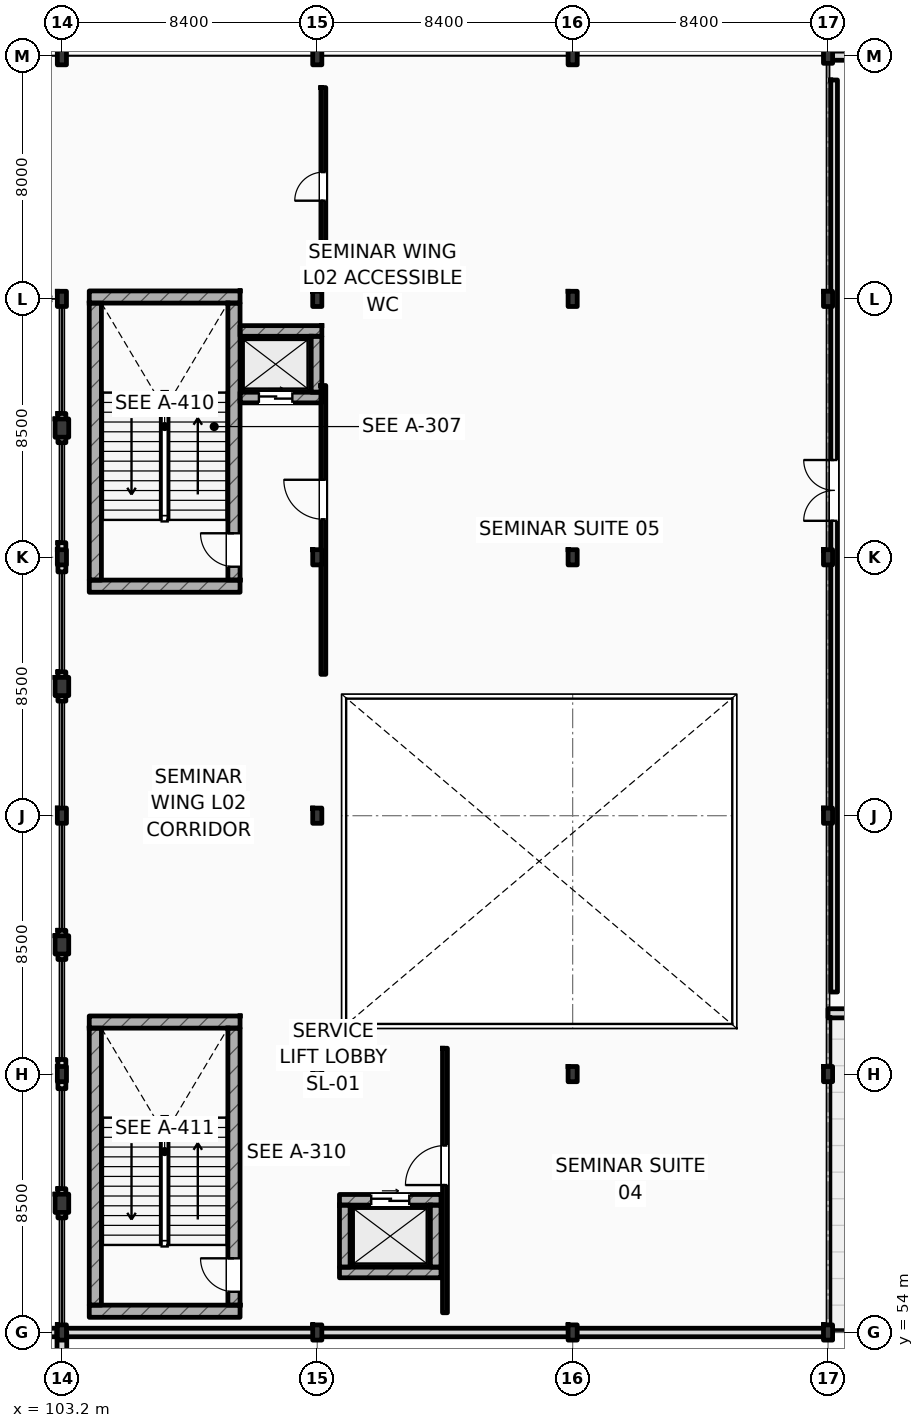
"""IFC4 building model, lengths in metres.
Left out: names, types, materials, properties, quantities, classifications, styles, units other than length and angle.
Written with IfcOpenShell. Run it as: python <this file> out.ifc"""

import sys

from ifc_helpers import new_model, si_unit, direction, frame, frame_2d, origin, origin_2d, place, context, subcontext, project, spatial, rectangle, i_section, extrude, element, fill, save


model = new_model("IFC4")
c1 = context("Model", 3, precision=1e-05, world=origin(), true_north=direction((0.0, 1.0)))
c2 = subcontext(c1, "Body", "Model", "MODEL_VIEW")
j1 = project(units=[si_unit("LENGTHUNIT", "METRE"), si_unit("PLANEANGLEUNIT", "RADIAN")], contexts=[c1])
p1 = place(None, origin())
s1 = spatial("IfcSite", under=j1, at=p1, CompositionType="ELEMENT")
p2 = place(p1, origin())
s2 = spatial("IfcBuilding", under=s1, at=p2, CompositionType="ELEMENT")
p3 = place(p2, frame((0.0, 0.0, 11.4)))
s3 = spatial("IfcBuildingStorey", under=s2, at=p3, CompositionType="ELEMENT", Elevation=11.4)
for number, where, z_axis, x_axis in (
    (1, (103.2, 96.0, 0.0), (0.0, 0.0, 1.0), (1.0, 0.0, 0.0)),
    (2, (111.6, 96.0, 0.0), (0.0, 0.0, 1.0), (1.0, 0.0, 0.0)),
    (3, (120.0, 96.0, 0.0), (0.0, 0.0, 1.0), (1.0, 0.0, 0.0)),
):
    element("IfcColumn", number, at=place(p3, frame(where, z_axis=z_axis, x_axis=x_axis)), inside=s3, PredefinedType="COLUMN", context=c2, shape_type="SweptSolid", body=[
        extrude(i_section(OverallWidth=0.3, OverallDepth=0.6, WebThickness=0.015, FlangeThickness=0.03, FilletRadius=0.027, at=origin_2d()), origin(), (0.0, 0.0, 1.0), 4.8),
    ])
for number, where, z_axis, x_axis in (
    (4, (103.2, 88.0, 0.0), (0.0, 0.0, 1.0), (1.0, 0.0, 0.0)),
    (5, (103.2, 54.0, 0.0), (0.0, 0.0, 1.0), (1.0, 0.0, 0.0)),
    (6, (103.2, 62.5, 0.0), (0.0, 0.0, 1.0), (1.0, 0.0, 0.0)),
    (7, (103.2, 71.0, 0.0), (0.0, 0.0, 1.0), (1.0, 0.0, 0.0)),
    (8, (103.2, 79.5, 0.0), (0.0, 0.0, 1.0), (1.0, 0.0, 0.0)),
    (9, (111.6, 54.0, 0.0), (0.0, 0.0, 1.0), (1.0, 0.0, 0.0)),
    (10, (111.6, 62.5, 0.0), (0.0, 0.0, 1.0), (1.0, 0.0, 0.0)),
    (11, (111.6, 71.0, 0.0), (0.0, 0.0, 1.0), (1.0, 0.0, 0.0)),
    (12, (111.6, 79.5, 0.0), (0.0, 0.0, 1.0), (1.0, 0.0, 0.0)),
    (13, (111.6, 88.0, 0.0), (0.0, 0.0, 1.0), (1.0, 0.0, 0.0)),
    (14, (120.0, 54.0, 0.0), (0.0, 0.0, 1.0), (1.0, 0.0, 0.0)),
    (15, (120.0, 62.5, 0.0), (0.0, 0.0, 1.0), (1.0, 0.0, 0.0)),
    (16, (120.0, 79.5, 0.0), (0.0, 0.0, 1.0), (1.0, 0.0, 0.0)),
    (17, (120.0, 88.0, 0.0), (0.0, 0.0, 1.0), (1.0, 0.0, 0.0)),
    (18, (128.4, 54.0, 0.0), (0.0, 0.0, 1.0), (1.0, 0.0, 0.0)),
    (19, (128.4, 62.5, 0.0), (0.0, 0.0, 1.0), (1.0, 0.0, 0.0)),
    (20, (128.4, 71.0, 0.0), (0.0, 0.0, 1.0), (1.0, 0.0, 0.0)),
    (21, (128.4, 79.5, 0.0), (0.0, 0.0, 1.0), (1.0, 0.0, 0.0)),
    (22, (128.4, 88.0, 0.0), (0.0, 0.0, 1.0), (1.0, 0.0, 0.0)),
    (23, (128.4, 96.0, 0.0), (0.0, 0.0, 1.0), (1.0, 0.0, 0.0)),
):
    element("IfcColumn", number, at=place(p3, frame(where, z_axis=z_axis, x_axis=x_axis)), inside=s3, PredefinedType="COLUMN", context=c2, shape_type="SweptSolid", body=[
        extrude(i_section(OverallWidth=0.3, OverallDepth=0.5, WebThickness=0.014, FlangeThickness=0.028, FilletRadius=0.027, at=origin_2d()), origin(), (0.0, 0.0, 1.0), 4.8),
    ])
for number, where, z_axis, x_axis in (
    (24, (103.2, 58.25, 0.0), (0.0, 0.0, 1.0), (1.0, 0.0, 0.0)),
    (25, (103.2, 66.75, 0.0), (0.0, 0.0, 1.0), (1.0, 0.0, 0.0)),
    (26, (103.2, 75.25, 0.0), (0.0, 0.0, 1.0), (1.0, 0.0, 0.0)),
    (27, (103.2, 83.75, 0.0), (0.0, 0.0, 1.0), (1.0, 0.0, 0.0)),
):
    element("IfcColumn", number, at=place(p3, frame(where, z_axis=z_axis, x_axis=x_axis)), inside=s3, PredefinedType="PILASTER", context=c2, shape_type="SweptSolid", body=[
        extrude(rectangle(XDim=0.45, YDim=0.6, at=origin_2d()), origin(), (0.0, 0.0, 1.0), 4.8),
    ])
for number, where, z_axis, x_axis in (
    (28, (104.1, 88.062, 0.0), (0.0, 0.0, 1.0), (1.0, 0.0, 0.0)),
    (29, (104.1, 78.55, 0.0), (0.0, 0.0, 1.0), (1.0, 0.0, 0.0)),
):
    element("IfcWall", number, at=place(p3, frame(where, z_axis=z_axis, x_axis=x_axis)), inside=s3, PredefinedType="SHEAR", context=c2, shape_type="SweptSolid", body=[
        extrude(rectangle(XDim=4.96, YDim=0.4, at=frame_2d((2.48, 0.0))), origin(), (0.0, 0.0, 1.0), 4.8),
    ])
p4 = place(p3, frame((104.3, 78.75, 0.0), z_axis=(0.0, 0.0, 1.0), x_axis=(0.0, 1.0, 0.0)))
e30 = element("IfcWall", 30, at=p4, inside=s3, PredefinedType="SHEAR", context=c2, shape_type="SweptSolid", body=[
    extrude(rectangle(XDim=9.112, YDim=0.4, at=frame_2d((4.556, 0.0))), origin(), (0.0, 0.0, 1.0), 4.8),
])
p5 = place(p3, frame((108.86, 78.75, 0.0), z_axis=(0.0, 0.0, 1.0), x_axis=(0.0, 1.0, 0.0)))
e31 = element("IfcWall", 31, at=p5, inside=s3, PredefinedType="SHEAR", context=c2, shape_type="SweptSolid", body=[
    extrude(rectangle(XDim=9.112, YDim=0.4, at=frame_2d((4.556, 0.0))), origin(), (0.0, 0.0, 1.0), 4.8),
])
p6 = place(p5, frame((0.44, 0.0, 0.0)))
e32 = element("IfcOpeningElement", 32, at=p6, cuts=e31, PredefinedType="OPENING", context=c2, shape_type="SweptSolid", body=[
    extrude(rectangle(XDim=1.1, YDim=2.2, at=frame_2d((0.55, 1.1))), frame((0.0, 0.21, 0.0), z_axis=(0.0, -1.0, 0.0), x_axis=(1.0, 0.0, 0.0)), (0.0, 0.0, 1.0), 0.42),
])
for number, where, z_axis, x_axis in (
    (33, (104.1, 64.212, 0.0), (0.0, 0.0, 1.0), (1.0, 0.0, 0.0)),
    (34, (104.1, 54.7, 0.0), (0.0, 0.0, 1.0), (1.0, 0.0, 0.0)),
):
    element("IfcWall", number, at=place(p3, frame(where, z_axis=z_axis, x_axis=x_axis)), inside=s3, PredefinedType="SHEAR", context=c2, shape_type="SweptSolid", body=[
        extrude(rectangle(XDim=4.96, YDim=0.4, at=frame_2d((2.48, 0.0))), origin(), (0.0, 0.0, 1.0), 4.8),
    ])
p7 = place(p3, frame((104.3, 54.9, 0.0), z_axis=(0.0, 0.0, 1.0), x_axis=(0.0, 1.0, 0.0)))
e35 = element("IfcWall", 35, at=p7, inside=s3, PredefinedType="SHEAR", context=c2, shape_type="SweptSolid", body=[
    extrude(rectangle(XDim=9.112, YDim=0.4, at=frame_2d((4.556, 0.0))), origin(), (0.0, 0.0, 1.0), 4.8),
])
p8 = place(p3, frame((108.86, 54.9, 0.0), z_axis=(0.0, 0.0, 1.0), x_axis=(0.0, 1.0, 0.0)))
e36 = element("IfcWall", 36, at=p8, inside=s3, PredefinedType="SHEAR", context=c2, shape_type="SweptSolid", body=[
    extrude(rectangle(XDim=9.112, YDim=0.4, at=frame_2d((4.556, 0.0))), origin(), (0.0, 0.0, 1.0), 4.8),
])
p9 = place(p8, frame((0.44, 0.0, 0.0)))
e37 = element("IfcOpeningElement", 37, at=p9, cuts=e36, PredefinedType="OPENING", context=c2, shape_type="SweptSolid", body=[
    extrude(rectangle(XDim=1.1, YDim=2.2, at=frame_2d((0.55, 1.1))), frame((0.0, 0.21, 0.0), z_axis=(0.0, -1.0, 0.0), x_axis=(1.0, 0.0, 0.0)), (0.0, 0.0, 1.0), 0.42),
])
p10 = place(p3, frame((103.2, 7.4, 0.0), z_axis=(0.0, 0.0, 1.0), x_axis=(0.0, 1.0, 0.0)))
e38 = element("IfcWall", 38, at=p10, inside=s3, PredefinedType="STANDARD", context=c2, shape_type="SweptSolid", body=[
    extrude(rectangle(XDim=46.6, YDim=0.32, at=frame_2d((23.3, 0.0))), origin(), (0.0, 0.0, 1.0), 4.02),
])
p11 = place(p3, frame((79.8, 54.0, 0.0), z_axis=(0.0, 0.0, 1.0), x_axis=(1.0, 0.0, 0.0)))
e39 = element("IfcWall", 39, at=p11, inside=s3, PredefinedType="STANDARD", context=c2, shape_type="SweptSolid", body=[
    extrude(rectangle(XDim=23.4, YDim=0.28, at=frame_2d((11.7, 0.0))), origin(), (0.0, 0.0, 1.0), 4.06),
])
p12 = place(p11, frame((10.65, 0.0, 1.05)))
e40 = element("IfcOpeningElement", 40, at=p12, cuts=e39, PredefinedType="OPENING", context=c2, shape_type="SweptSolid", body=[
    extrude(rectangle(XDim=2.1, YDim=2.2, at=frame_2d((1.05, 1.1))), frame((0.0, 0.15, 0.0), z_axis=(0.0, -1.0, 0.0), x_axis=(1.0, 0.0, 0.0)), (0.0, 0.0, 1.0), 0.3),
])
p13 = place(p3, frame((103.2, 54.0, 0.0), z_axis=(0.0, 0.0, 1.0), x_axis=(1.0, 0.0, 0.0)))
e41 = element("IfcWall", 41, at=p13, inside=s3, PredefinedType="STANDARD", context=c2, shape_type="SweptSolid", body=[
    extrude(rectangle(XDim=25.2, YDim=0.28, at=frame_2d((12.6, 0.0))), origin(), (0.0, 0.0, 1.0), 3.96),
])
for number, where, z_axis, x_axis in (
    (42, (103.2, 57.77, 0.0), (0.0, 0.0, 1.0), (0.0, 1.0, 0.0)),
    (43, (103.2, 62.02, 0.0), (0.0, 0.0, 1.0), (0.0, 1.0, 0.0)),
    (44, (103.2, 66.27, 0.0), (0.0, 0.0, 1.0), (0.0, 1.0, 0.0)),
    (45, (103.2, 74.77, 0.0), (0.0, 0.0, 1.0), (0.0, 1.0, 0.0)),
    (46, (103.2, 79.02, 0.0), (0.0, 0.0, 1.0), (0.0, 1.0, 0.0)),
    (47, (103.2, 83.27, 0.0), (0.0, 0.0, 1.0), (0.0, 1.0, 0.0)),
):
    element("IfcWall", number, at=place(p3, frame(where, z_axis=z_axis, x_axis=x_axis)), inside=s3, PredefinedType="STANDARD", context=c2, shape_type="SweptSolid", body=[
        extrude(rectangle(XDim=0.96, YDim=0.26, at=frame_2d((0.48, 0.0))), origin(), (0.0, 0.0, 1.0), 4.11),
    ])
p14 = place(p3, frame((128.4, 64.5, 0.0), z_axis=(0.0, 0.0, 1.0), x_axis=(1.0, 0.0, 0.0)))
e48 = element("IfcWall", 48, at=p14, inside=s3, PredefinedType="STANDARD", context=c2, shape_type="SweptSolid", body=[
    extrude(rectangle(XDim=9.0, YDim=0.3, at=frame_2d((4.5, 0.0))), origin(), (0.0, 0.0, 1.0), 4.54),
])
p15 = place(p3, frame((128.4, 96.0, 0.0), z_axis=(0.0, 0.0, 1.0), x_axis=(1.0, 0.0, 0.0)))
e49 = element("IfcWall", 49, at=p15, inside=s3, PredefinedType="STANDARD", context=c2, shape_type="SweptSolid", body=[
    extrude(rectangle(XDim=9.0, YDim=0.3, at=frame_2d((4.5, 0.0))), origin(), (0.0, 0.0, 1.0), 4.05),
])
p16 = place(p3, frame((120.0, 96.0, 0.0), z_axis=(0.0, 0.0, 1.0), x_axis=(0.0, 1.0, 0.0)))
e50 = element("IfcWall", 50, at=p16, inside=s3, PredefinedType="STANDARD", context=c2, shape_type="SweptSolid", body=[
    extrude(rectangle(XDim=22.0, YDim=0.28, at=frame_2d((11.0, 0.0))), origin(), (0.0, 0.0, 1.0), 4.11),
])
p17 = place(p3, frame((109.06, 86.945, 0.0), z_axis=(0.0, 0.0, 1.0), x_axis=(1.0, 0.0, 0.0)))
e51 = element("IfcWall", 51, at=p17, inside=s3, PredefinedType="SHEAR", context=c2, shape_type="SweptSolid", body=[
    extrude(rectangle(XDim=2.69, YDim=0.35, at=frame_2d((1.345, 0.0))), origin(), (0.0, 0.0, 1.0), 4.52),
])
p18 = place(p3, frame((109.06, 84.755, 0.0), z_axis=(0.0, 0.0, 1.0), x_axis=(1.0, 0.0, 0.0)))
e52 = element("IfcWall", 52, at=p18, inside=s3, PredefinedType="SHEAR", context=c2, shape_type="SweptSolid", body=[
    extrude(rectangle(XDim=2.69, YDim=0.35, at=frame_2d((1.345, 0.0))), origin(), (0.0, 0.0, 1.0), 4.52),
])
p19 = place(p18, frame((0.62, 0.0, 0.0)))
e53 = element("IfcOpeningElement", 53, at=p19, cuts=e52, PredefinedType="OPENING", context=c2, shape_type="SweptSolid", body=[
    extrude(rectangle(XDim=1.1, YDim=2.2, at=frame_2d((0.55, 1.1))), frame((0.0, 0.185, 0.0), z_axis=(0.0, -1.0, 0.0), x_axis=(1.0, 0.0, 0.0)), (0.0, 0.0, 1.0), 0.37),
])
p20 = place(p3, frame((111.575, 84.93, 0.0), z_axis=(0.0, 0.0, 1.0), x_axis=(0.0, 1.0, 0.0)))
e54 = element("IfcWall", 54, at=p20, inside=s3, PredefinedType="SHEAR", context=c2, shape_type="SweptSolid", body=[
    extrude(rectangle(XDim=1.84, YDim=0.35, at=frame_2d((0.92, 0.0))), origin(), (0.0, 0.0, 1.0), 4.11),
])
p21 = place(p3, frame((112.33, 58.365, 0.0), z_axis=(0.0, 0.0, 1.0), x_axis=(1.0, 0.0, 0.0)))
e55 = element("IfcWall", 55, at=p21, inside=s3, PredefinedType="SHEAR", context=c2, shape_type="SweptSolid", body=[
    extrude(rectangle(XDim=3.34, YDim=0.35, at=frame_2d((1.67, 0.0))), origin(), (0.0, 0.0, 1.0), 4.52),
])
p22 = place(p21, frame((1.045, 0.0, 0.0)))
e56 = element("IfcOpeningElement", 56, at=p22, cuts=e55, PredefinedType="OPENING", context=c2, shape_type="SweptSolid", body=[
    extrude(rectangle(XDim=1.25, YDim=2.25, at=frame_2d((0.625, 1.125))), frame((0.0, 0.185, 0.0), z_axis=(0.0, -1.0, 0.0), x_axis=(1.0, 0.0, 0.0)), (0.0, 0.0, 1.0), 0.37),
])
p23 = place(p3, frame((112.33, 55.975, 0.0), z_axis=(0.0, 0.0, 1.0), x_axis=(1.0, 0.0, 0.0)))
e57 = element("IfcWall", 57, at=p23, inside=s3, PredefinedType="SHEAR", context=c2, shape_type="SweptSolid", body=[
    extrude(rectangle(XDim=3.34, YDim=0.35, at=frame_2d((1.67, 0.0))), origin(), (0.0, 0.0, 1.0), 4.52),
])
for number, where, z_axis, x_axis in (
    (58, (112.505, 56.15, 0.0), (0.0, 0.0, 1.0), (0.0, 1.0, 0.0)),
    (59, (115.495, 56.15, 0.0), (0.0, 0.0, 1.0), (0.0, 1.0, 0.0)),
):
    element("IfcWall", number, at=place(p3, frame(where, z_axis=z_axis, x_axis=x_axis)), inside=s3, PredefinedType="SHEAR", context=c2, shape_type="SweptSolid", body=[
        extrude(rectangle(XDim=2.04, YDim=0.35, at=frame_2d((1.02, 0.0))), origin(), (0.0, 0.0, 1.0), 4.52),
    ])
p24 = place(p3, frame((115.8, 54.65, 0.0), z_axis=(0.0, 0.0, 1.0), x_axis=(0.0, 1.0, 0.0)))
e60 = element("IfcWall", 60, at=p24, inside=s3, PredefinedType="PARTITIONING", context=c2, shape_type="SweptSolid", body=[
    extrude(rectangle(XDim=8.7, YDim=0.16, at=frame_2d((4.35, 0.0))), origin(), (0.0, 0.0, 1.0), 4.52),
])
p25 = place(p24, frame((4.2, 0.0, 0.0)))
e61 = element("IfcOpeningElement", 61, at=p25, cuts=e60, PredefinedType="OPENING", context=c2, shape_type="SweptSolid", body=[
    extrude(rectangle(XDim=1.3, YDim=2.2, at=frame_2d((0.65, 1.1))), frame((0.0, 0.09, 0.0), z_axis=(0.0, -1.0, 0.0), x_axis=(1.0, 0.0, 0.0)), (0.0, 0.0, 1.0), 0.18),
])
p26 = place(p3, frame((111.8, 75.65, 0.0), z_axis=(0.0, 0.0, 1.0), x_axis=(0.0, 1.0, 0.0)))
e62 = element("IfcWall", 62, at=p26, inside=s3, PredefinedType="PARTITIONING", context=c2, shape_type="SweptSolid", body=[
    extrude(rectangle(XDim=9.5, YDim=0.16, at=frame_2d((4.75, 0.0))), origin(), (0.0, 0.0, 1.0), 4.11),
])
p27 = place(p26, frame((5.1, 0.0, 0.0)))
e63 = element("IfcOpeningElement", 63, at=p27, cuts=e62, PredefinedType="OPENING", context=c2, shape_type="SweptSolid", body=[
    extrude(rectangle(XDim=1.3, YDim=2.2, at=frame_2d((0.65, 1.1))), frame((0.0, 0.09, 0.0), z_axis=(0.0, -1.0, 0.0), x_axis=(1.0, 0.0, 0.0)), (0.0, 0.0, 1.0), 0.18),
])
p28 = place(p3, frame((111.8, 88.45, 0.0), z_axis=(0.0, 0.0, 1.0), x_axis=(0.0, 1.0, 0.0)))
e64 = element("IfcWall", 64, at=p28, inside=s3, PredefinedType="PARTITIONING", context=c2, shape_type="SweptSolid", body=[
    extrude(rectangle(XDim=6.5, YDim=0.16, at=frame_2d((3.25, 0.0))), origin(), (0.0, 0.0, 1.0), 4.11),
])
p29 = place(p28, frame((2.78, 0.0, 0.0)))
e65 = element("IfcOpeningElement", 65, at=p29, cuts=e64, PredefinedType="OPENING", context=c2, shape_type="SweptSolid", body=[
    extrude(rectangle(XDim=0.94, YDim=2.15, at=frame_2d((0.47, 1.075))), frame((0.0, 0.09, 0.0), z_axis=(0.0, -1.0, 0.0), x_axis=(1.0, 0.0, 0.0)), (0.0, 0.0, 1.0), 0.18),
])
p30 = place(p3, frame((128.6, 65.2, 0.0), z_axis=(0.0, 0.0, 1.0), x_axis=(0.0, 1.0, 0.0)))
e66 = element("IfcWall", 66, at=p30, inside=s3, PredefinedType="PARTITIONING", context=c2, shape_type="SweptSolid", body=[
    extrude(rectangle(XDim=30.0, YDim=0.22, at=frame_2d((15.0, 0.0))), origin(), (0.0, 0.0, 1.0), 4.11),
])
p31 = place(p30, frame((15.5, 0.0, 0.0)))
e67 = element("IfcOpeningElement", 67, at=p31, cuts=e66, PredefinedType="OPENING", context=c2, shape_type="SweptSolid", body=[
    extrude(rectangle(XDim=2.0, YDim=2.35, at=frame_2d((1.0, 1.175))), frame((0.0, 0.12, 0.0), z_axis=(0.0, -1.0, 0.0), x_axis=(1.0, 0.0, 0.0)), (0.0, 0.0, 1.0), 0.24),
])
p32 = place(p6, origin())
e68 = element("IfcDoor", 68, at=p32, inside=s3, OperationType="SINGLE_SWING_RIGHT", PredefinedType="DOOR", context=c2, shape_type="SweptSolid", body=[
    extrude(rectangle(XDim=1.1, YDim=2.2, at=frame_2d((0.55, 1.1))), frame((0.0, 0.025, 0.0), z_axis=(0.0, -1.0, 0.0), x_axis=(1.0, 0.0, 0.0)), (0.0, 0.0, 1.0), 0.05),
])
fill(e32, e68)
p33 = place(p9, origin())
e69 = element("IfcDoor", 69, at=p33, inside=s3, OperationType="SINGLE_SWING_RIGHT", PredefinedType="DOOR", context=c2, shape_type="SweptSolid", body=[
    extrude(rectangle(XDim=1.1, YDim=2.2, at=frame_2d((0.55, 1.1))), frame((0.0, 0.025, 0.0), z_axis=(0.0, -1.0, 0.0), x_axis=(1.0, 0.0, 0.0)), (0.0, 0.0, 1.0), 0.05),
])
fill(e37, e69)
p34 = place(p19, origin())
e70 = element("IfcDoor", 70, at=p34, inside=s3, OperationType="SLIDING_TO_LEFT", PredefinedType="DOOR", context=c2, shape_type="SweptSolid", body=[
    extrude(rectangle(XDim=1.1, YDim=2.2, at=frame_2d((0.55, 1.1))), frame((0.0, 0.025, 0.0), z_axis=(0.0, -1.0, 0.0), x_axis=(1.0, 0.0, 0.0)), (0.0, 0.0, 1.0), 0.05),
])
fill(e53, e70)
p35 = place(p22, origin())
e71 = element("IfcDoor", 71, at=p35, inside=s3, OperationType="SLIDING_TO_LEFT", PredefinedType="DOOR", context=c2, shape_type="SweptSolid", body=[
    extrude(rectangle(XDim=1.25, YDim=2.25, at=frame_2d((0.625, 1.125))), frame((0.0, 0.025, 0.0), z_axis=(0.0, -1.0, 0.0), x_axis=(1.0, 0.0, 0.0)), (0.0, 0.0, 1.0), 0.05),
])
fill(e56, e71)
p36 = place(p25, origin())
e72 = element("IfcDoor", 72, at=p36, inside=s3, OperationType="SINGLE_SWING_LEFT", PredefinedType="DOOR", context=c2, shape_type="SweptSolid", body=[
    extrude(rectangle(XDim=1.3, YDim=2.2, at=frame_2d((0.65, 1.1))), frame((0.0, 0.025, 0.0), z_axis=(0.0, -1.0, 0.0), x_axis=(1.0, 0.0, 0.0)), (0.0, 0.0, 1.0), 0.05),
])
fill(e61, e72)
p37 = place(p27, origin())
e73 = element("IfcDoor", 73, at=p37, inside=s3, OperationType="SINGLE_SWING_RIGHT", PredefinedType="DOOR", context=c2, shape_type="SweptSolid", body=[
    extrude(rectangle(XDim=1.3, YDim=2.2, at=frame_2d((0.65, 1.1))), frame((0.0, 0.025, 0.0), z_axis=(0.0, -1.0, 0.0), x_axis=(1.0, 0.0, 0.0)), (0.0, 0.0, 1.0), 0.05),
])
fill(e63, e73)
p38 = place(p29, origin())
e74 = element("IfcDoor", 74, at=p38, inside=s3, OperationType="SINGLE_SWING_LEFT", PredefinedType="DOOR", context=c2, shape_type="SweptSolid", body=[
    extrude(rectangle(XDim=0.94, YDim=2.15, at=frame_2d((0.47, 1.075))), frame((0.0, 0.025, 0.0), z_axis=(0.0, -1.0, 0.0), x_axis=(1.0, 0.0, 0.0)), (0.0, 0.0, 1.0), 0.05),
])
fill(e65, e74)
p39 = place(p31, origin())
e75 = element("IfcDoor", 75, at=p39, inside=s3, OperationType="DOUBLE_SWING_LEFT", PredefinedType="DOOR", context=c2, shape_type="SweptSolid", body=[
    extrude(rectangle(XDim=2.0, YDim=2.35, at=frame_2d((1.0, 1.175))), frame((0.0, 0.025, 0.0), z_axis=(0.0, -1.0, 0.0), x_axis=(1.0, 0.0, 0.0)), (0.0, 0.0, 1.0), 0.05),
])
fill(e67, e75)
save(model, sys.argv[1])
